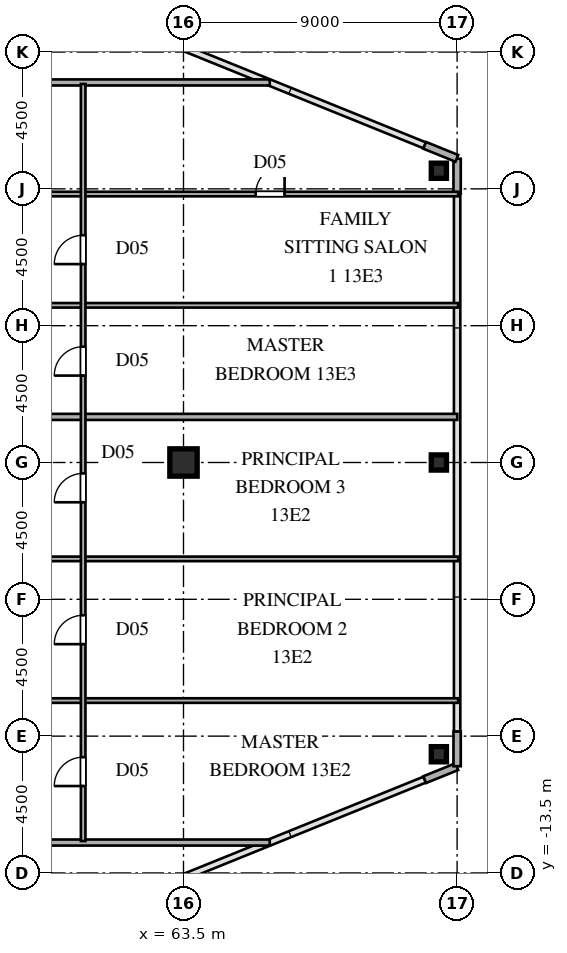
"""IFC4 building model, lengths in metres.
Left out: names, types, materials, properties, quantities, classifications, styles, units other than length and angle.
Written with IfcOpenShell. Run it as: python <this file> out.ifc"""

import sys

from ifc_helpers import new_model, si_unit, direction, frame, frame_2d, origin, origin_2d, place, context, subcontext, project, spatial, rectangle, hollow_rectangle, i_section, extrude, source, transform, mapped, element, fill, save


model = new_model("IFC4")
c1 = context("Model", 3, precision=1e-05, world=origin(), true_north=direction((0.0, 1.0)))
c2 = subcontext(c1, "Body", "Model", "MODEL_VIEW")
j1 = project(units=[si_unit("LENGTHUNIT", "METRE"), si_unit("PLANEANGLEUNIT", "RADIAN")], contexts=[c1])
p1 = place(None, origin())
s1 = spatial("IfcSite", under=j1, at=p1, CompositionType="ELEMENT")
p2 = place(p1, origin())
s2 = spatial("IfcBuilding", under=s1, at=p2, CompositionType="ELEMENT")
p3 = place(p2, frame((0.0, 0.0, 51.3)))
s3 = spatial("IfcBuildingStorey", under=s2, at=p3, CompositionType="ELEMENT", Elevation=51.3)
m1 = source(origin(), c2, "Body", "SweptSolid", [
    extrude(i_section(OverallWidth=0.9, OverallDepth=0.9, WebThickness=0.036, FlangeThickness=0.055, at=origin_2d()), origin(), (0.0, 0.0, 1.0), 3.6),
])
p4 = place(p3, frame((63.5, 0.0, 0.0), z_axis=(0.0, 0.0, 1.0), x_axis=(1.0, 0.0, 0.0)))
e1 = element("IfcColumn", 1, at=p4, inside=s3, PredefinedType="COLUMN", context=c2, shape_type="MappedRepresentation", body=[
    mapped(m1, transform((0.0, 0.0, 0.0), scale=1.0)),
])
m2 = source(origin(), c2, "Body", "SweptSolid", [
    extrude(hollow_rectangle(XDim=0.5, YDim=0.5, WallThickness=0.02, at=origin_2d()), origin(), (0.0, 0.0, 1.0), 3.6),
])
for number, where, z_axis, x_axis in (
    (2, (71.9, -9.596, 0.0), (0.0, 0.0, 1.0), (1.0, 0.0, 0.0)),
    (3, (71.9, 9.596, 0.0), (0.0, 0.0, 1.0), (1.0, 0.0, 0.0)),
    (4, (71.9, 0.0, 0.0), (0.0, 0.0, 1.0), (1.0, 0.0, 0.0)),
):
    element("IfcColumn", number, at=place(p3, frame(where, z_axis=z_axis, x_axis=x_axis)), inside=s3, PredefinedType="COLUMN", context=c2, shape_type="MappedRepresentation", body=[
        mapped(m2, transform((0.0, 0.0, 0.0), scale=1.0)),
    ])
for number, where, z_axis, x_axis in (
    (5, (71.434, -10.431, 0.0), (0.0, 0.0, 1.0), (0.927, 0.375, 0.0)),
    (6, (72.5, -9.99, 0.0), (0.0, 0.0, 1.0), (0.0, 1.0, 0.0)),
    (7, (72.5, 8.85, 0.0), (0.0, 0.0, 1.0), (0.0, 1.0, 0.0)),
    (8, (72.491, 10.004, 0.0), (0.0, 0.0, 1.0), (-0.927, 0.375, 0.0)),
):
    element("IfcWall", number, at=place(p3, frame(where, z_axis=z_axis, x_axis=x_axis)), inside=s3, PredefinedType="SOLIDWALL", context=c2, shape_type="SweptSolid", body=[
        extrude(rectangle(XDim=1.14, YDim=0.24, at=frame_2d((0.57, 0.0))), origin(), (0.0, 0.0, 1.0), 3.38),
    ])
p5 = place(p3, frame((39.93, -12.5, 0.0), z_axis=(0.0, 0.0, 1.0), x_axis=(1.0, 0.0, 0.0)))
e9 = element("IfcWall", 9, at=p5, inside=s3, PredefinedType="PARTITIONING", context=c2, shape_type="SweptSolid", body=[
    extrude(rectangle(XDim=26.407, YDim=0.2, at=frame_2d((13.204, 0.0))), origin(), (0.0, 0.0, 1.0), 3.38),
])
p6 = place(p3, frame((42.65, -7.83, 0.0), z_axis=(0.0, 0.0, 1.0), x_axis=(1.0, 0.0, 0.0)))
e10 = element("IfcWall", 10, at=p6, inside=s3, PredefinedType="PARTITIONING", context=c2, shape_type="SweptSolid", body=[
    extrude(rectangle(XDim=29.885, YDim=0.15, at=frame_2d((14.942, 0.0))), origin(), (0.0, 0.0, 1.0), 3.38),
])
p7 = place(p6, frame((5.425, 0.0, 0.0)))
e11 = element("IfcOpeningElement", 11, at=p7, cuts=e10, PredefinedType="OPENING", context=c2, shape_type="SweptSolid", body=[
    extrude(rectangle(XDim=0.95, YDim=2.15, at=frame_2d((0.475, 1.075))), frame((0.0, 0.085, 0.0), z_axis=(0.0, -1.0, 0.0), x_axis=(1.0, 0.0, 0.0)), (0.0, 0.0, 1.0), 0.17),
])
p8 = place(p6, frame((14.225, 0.0, 0.0)))
e12 = element("IfcOpeningElement", 12, at=p8, cuts=e10, PredefinedType="OPENING", context=c2, shape_type="SweptSolid", body=[
    extrude(rectangle(XDim=0.95, YDim=2.15, at=frame_2d((0.475, 1.075))), frame((0.0, 0.085, 0.0), z_axis=(0.0, -1.0, 0.0), x_axis=(1.0, 0.0, 0.0)), (0.0, 0.0, 1.0), 0.17),
])
p9 = place(p3, frame((42.65, -3.17, 0.0), z_axis=(0.0, 0.0, 1.0), x_axis=(1.0, 0.0, 0.0)))
e13 = element("IfcWall", 13, at=p9, inside=s3, PredefinedType="PARTITIONING", context=c2, shape_type="SweptSolid", body=[
    extrude(rectangle(XDim=29.885, YDim=0.15, at=frame_2d((14.942, 0.0))), origin(), (0.0, 0.0, 1.0), 3.38),
])
p10 = place(p9, frame((5.425, 0.0, 0.0)))
e14 = element("IfcOpeningElement", 14, at=p10, cuts=e13, PredefinedType="OPENING", context=c2, shape_type="SweptSolid", body=[
    extrude(rectangle(XDim=0.95, YDim=2.15, at=frame_2d((0.475, 1.075))), frame((0.0, 0.085, 0.0), z_axis=(0.0, -1.0, 0.0), x_axis=(1.0, 0.0, 0.0)), (0.0, 0.0, 1.0), 0.17),
])
p11 = place(p9, frame((14.225, 0.0, 0.0)))
e15 = element("IfcOpeningElement", 15, at=p11, cuts=e13, PredefinedType="OPENING", context=c2, shape_type="SweptSolid", body=[
    extrude(rectangle(XDim=0.95, YDim=2.15, at=frame_2d((0.475, 1.075))), frame((0.0, 0.085, 0.0), z_axis=(0.0, -1.0, 0.0), x_axis=(1.0, 0.0, 0.0)), (0.0, 0.0, 1.0), 0.17),
])
p12 = place(p3, frame((39.93, 1.5, 0.0), z_axis=(0.0, 0.0, 1.0), x_axis=(1.0, 0.0, 0.0)))
e16 = element("IfcWall", 16, at=p12, inside=s3, PredefinedType="PARTITIONING", context=c2, shape_type="SweptSolid", body=[
    extrude(rectangle(XDim=32.575, YDim=0.2, at=frame_2d((16.288, 0.0))), origin(), (0.0, 0.0, 1.0), 3.38),
])
p13 = place(p3, frame((42.65, 5.17, 0.0), z_axis=(0.0, 0.0, 1.0), x_axis=(1.0, 0.0, 0.0)))
e17 = element("IfcWall", 17, at=p13, inside=s3, PredefinedType="PARTITIONING", context=c2, shape_type="SweptSolid", body=[
    extrude(rectangle(XDim=29.885, YDim=0.15, at=frame_2d((14.942, 0.0))), origin(), (0.0, 0.0, 1.0), 3.38),
])
p14 = place(p13, frame((5.425, 0.0, 0.0)))
e18 = element("IfcOpeningElement", 18, at=p14, cuts=e17, PredefinedType="OPENING", context=c2, shape_type="SweptSolid", body=[
    extrude(rectangle(XDim=0.95, YDim=2.15, at=frame_2d((0.475, 1.075))), frame((0.0, 0.085, 0.0), z_axis=(0.0, -1.0, 0.0), x_axis=(1.0, 0.0, 0.0)), (0.0, 0.0, 1.0), 0.17),
])
p15 = place(p13, frame((14.225, 0.0, 0.0)))
e19 = element("IfcOpeningElement", 19, at=p15, cuts=e17, PredefinedType="OPENING", context=c2, shape_type="SweptSolid", body=[
    extrude(rectangle(XDim=0.95, YDim=2.15, at=frame_2d((0.475, 1.075))), frame((0.0, 0.085, 0.0), z_axis=(0.0, -1.0, 0.0), x_axis=(1.0, 0.0, 0.0)), (0.0, 0.0, 1.0), 0.17),
])
p16 = place(p3, frame((42.65, 8.83, 0.0), z_axis=(0.0, 0.0, 1.0), x_axis=(1.0, 0.0, 0.0)))
e20 = element("IfcWall", 20, at=p16, inside=s3, PredefinedType="PARTITIONING", context=c2, shape_type="SweptSolid", body=[
    extrude(rectangle(XDim=29.885, YDim=0.15, at=frame_2d((14.942, 0.0))), origin(), (0.0, 0.0, 1.0), 3.38),
])
p17 = place(p16, frame((5.425, 0.0, 0.0)))
e21 = element("IfcOpeningElement", 21, at=p17, cuts=e20, PredefinedType="OPENING", context=c2, shape_type="SweptSolid", body=[
    extrude(rectangle(XDim=0.95, YDim=2.15, at=frame_2d((0.475, 1.075))), frame((0.0, 0.085, 0.0), z_axis=(0.0, -1.0, 0.0), x_axis=(1.0, 0.0, 0.0)), (0.0, 0.0, 1.0), 0.17),
])
p18 = place(p16, frame((23.225, 0.0, 0.0)))
e22 = element("IfcOpeningElement", 22, at=p18, cuts=e20, PredefinedType="OPENING", context=c2, shape_type="SweptSolid", body=[
    extrude(rectangle(XDim=0.95, YDim=2.15, at=frame_2d((0.475, 1.075))), frame((0.0, 0.085, 0.0), z_axis=(0.0, -1.0, 0.0), x_axis=(1.0, 0.0, 0.0)), (0.0, 0.0, 1.0), 0.17),
])
p19 = place(p16, frame((14.225, 0.0, 0.0)))
e23 = element("IfcOpeningElement", 23, at=p19, cuts=e20, PredefinedType="OPENING", context=c2, shape_type="SweptSolid", body=[
    extrude(rectangle(XDim=0.95, YDim=2.15, at=frame_2d((0.475, 1.075))), frame((0.0, 0.085, 0.0), z_axis=(0.0, -1.0, 0.0), x_axis=(1.0, 0.0, 0.0)), (0.0, 0.0, 1.0), 0.17),
])
p20 = place(p3, frame((39.93, 12.5, 0.0), z_axis=(0.0, 0.0, 1.0), x_axis=(1.0, 0.0, 0.0)))
e24 = element("IfcWall", 24, at=p20, inside=s3, PredefinedType="PARTITIONING", context=c2, shape_type="SweptSolid", body=[
    extrude(rectangle(XDim=26.407, YDim=0.2, at=frame_2d((13.204, 0.0))), origin(), (0.0, 0.0, 1.0), 3.38),
])
p21 = place(p3, frame((60.2, -12.45, 0.0), z_axis=(0.0, 0.0, 1.0), x_axis=(0.0, 1.0, 0.0)))
e25 = element("IfcWall", 25, at=p21, inside=s3, PredefinedType="PARTITIONING", context=c2, shape_type="SweptSolid", body=[
    extrude(rectangle(XDim=24.9, YDim=0.15, at=frame_2d((12.45, 0.0))), origin(), (0.0, 0.0, 1.0), 3.38),
])
p22 = place(p21, frame((1.808, 0.0, 0.0)))
e26 = element("IfcOpeningElement", 26, at=p22, cuts=e25, PredefinedType="OPENING", context=c2, shape_type="SweptSolid", body=[
    extrude(rectangle(XDim=0.95, YDim=2.15, at=frame_2d((0.475, 1.075))), frame((0.0, 0.085, 0.0), z_axis=(0.0, -1.0, 0.0), x_axis=(1.0, 0.0, 0.0)), (0.0, 0.0, 1.0), 0.17),
])
p23 = place(p21, frame((6.475, 0.0, 0.0)))
e27 = element("IfcOpeningElement", 27, at=p23, cuts=e25, PredefinedType="OPENING", context=c2, shape_type="SweptSolid", body=[
    extrude(rectangle(XDim=0.95, YDim=2.15, at=frame_2d((0.475, 1.075))), frame((0.0, 0.085, 0.0), z_axis=(0.0, -1.0, 0.0), x_axis=(1.0, 0.0, 0.0)), (0.0, 0.0, 1.0), 0.17),
])
p24 = place(p21, frame((11.142, 0.0, 0.0)))
e28 = element("IfcOpeningElement", 28, at=p24, cuts=e25, PredefinedType="OPENING", context=c2, shape_type="SweptSolid", body=[
    extrude(rectangle(XDim=0.95, YDim=2.15, at=frame_2d((0.475, 1.075))), frame((0.0, 0.085, 0.0), z_axis=(0.0, -1.0, 0.0), x_axis=(1.0, 0.0, 0.0)), (0.0, 0.0, 1.0), 0.17),
])
p25 = place(p21, frame((15.308, 0.0, 0.0)))
e29 = element("IfcOpeningElement", 29, at=p25, cuts=e25, PredefinedType="OPENING", context=c2, shape_type="SweptSolid", body=[
    extrude(rectangle(XDim=0.95, YDim=2.15, at=frame_2d((0.475, 1.075))), frame((0.0, 0.085, 0.0), z_axis=(0.0, -1.0, 0.0), x_axis=(1.0, 0.0, 0.0)), (0.0, 0.0, 1.0), 0.17),
])
p26 = place(p21, frame((18.975, 0.0, 0.0)))
e30 = element("IfcOpeningElement", 30, at=p26, cuts=e25, PredefinedType="OPENING", context=c2, shape_type="SweptSolid", body=[
    extrude(rectangle(XDim=0.95, YDim=2.15, at=frame_2d((0.475, 1.075))), frame((0.0, 0.085, 0.0), z_axis=(0.0, -1.0, 0.0), x_axis=(1.0, 0.0, 0.0)), (0.0, 0.0, 1.0), 0.17),
])
m3 = source(origin(), c2, "Body", "SweptSolid", [
    extrude(rectangle(XDim=0.95, YDim=2.15, at=frame_2d((0.475, 1.075))), frame((0.0, 0.025, 0.0), z_axis=(0.0, -1.0, 0.0), x_axis=(1.0, 0.0, 0.0)), (0.0, 0.0, 1.0), 0.05),
])
p27 = place(p18, origin())
e31 = element("IfcDoor", 31, at=p27, inside=s3, OperationType="SINGLE_SWING_RIGHT", PredefinedType="DOOR", context=c2, shape_type="MappedRepresentation", body=[
    mapped(m3, transform((0.0, 0.0, 0.0), scale=1.0)),
])
fill(e22, e31)
p28 = place(p22, origin())
e32 = element("IfcDoor", 32, at=p28, inside=s3, OperationType="SINGLE_SWING_LEFT", PredefinedType="DOOR", context=c2, shape_type="MappedRepresentation", body=[
    mapped(m3, transform((0.0, 0.0, 0.0), scale=1.0)),
])
fill(e26, e32)
p29 = place(p23, origin())
e33 = element("IfcDoor", 33, at=p29, inside=s3, OperationType="SINGLE_SWING_LEFT", PredefinedType="DOOR", context=c2, shape_type="MappedRepresentation", body=[
    mapped(m3, transform((0.0, 0.0, 0.0), scale=1.0)),
])
fill(e27, e33)
p30 = place(p24, origin())
e34 = element("IfcDoor", 34, at=p30, inside=s3, OperationType="SINGLE_SWING_LEFT", PredefinedType="DOOR", context=c2, shape_type="MappedRepresentation", body=[
    mapped(m3, transform((0.0, 0.0, 0.0), scale=1.0)),
])
fill(e28, e34)
p31 = place(p25, origin())
e35 = element("IfcDoor", 35, at=p31, inside=s3, OperationType="SINGLE_SWING_LEFT", PredefinedType="DOOR", context=c2, shape_type="MappedRepresentation", body=[
    mapped(m3, transform((0.0, 0.0, 0.0), scale=1.0)),
])
fill(e29, e35)
p32 = place(p26, origin())
e36 = element("IfcDoor", 36, at=p32, inside=s3, OperationType="SINGLE_SWING_LEFT", PredefinedType="DOOR", context=c2, shape_type="MappedRepresentation", body=[
    mapped(m3, transform((0.0, 0.0, 0.0), scale=1.0)),
])
fill(e30, e36)
save(model, sys.argv[1])
